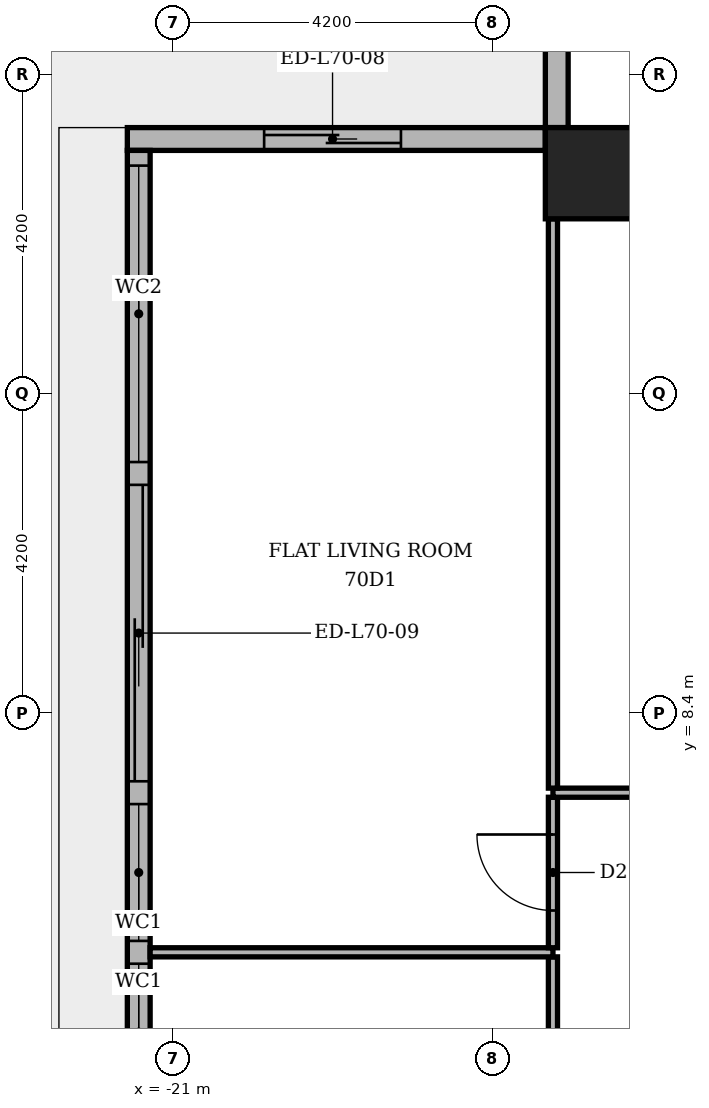
"""IFC4 building model, lengths in metres.
Left out: names, types, materials, properties, quantities, classifications, styles, units other than length and angle.
Written with IfcOpenShell. Run it as: python <this file> out.ifc"""

import sys

from ifc_helpers import new_model, si_unit, direction, frame, frame_2d, origin, origin_2d, place, context, subcontext, project, spatial, rectangle, extrude, element, fill, save


model = new_model("IFC4")
c1 = context("Model", 3, precision=1e-05, world=origin(), true_north=direction((0.0, 1.0)))
c2 = subcontext(c1, "Body", "Model", "MODEL_VIEW")
j1 = project(units=[si_unit("LENGTHUNIT", "METRE"), si_unit("PLANEANGLEUNIT", "RADIAN")], contexts=[c1])
p1 = place(None, origin())
s1 = spatial("IfcSite", under=j1, at=p1, CompositionType="ELEMENT")
p2 = place(p1, origin())
s2 = spatial("IfcBuilding", under=s1, at=p2, CompositionType="ELEMENT")
p3 = place(p2, frame((0.0, 0.0, 292.8)))
s3 = spatial("IfcBuildingStorey", under=s2, at=p3, CompositionType="ELEMENT", Elevation=292.8)
p4 = place(p3, frame((-15.5, 15.5, -0.35), z_axis=(0.0, 0.0, 1.0), x_axis=(1.0, 0.0, 0.0)))
e1 = element("IfcColumn", 1, at=p4, inside=s3, PredefinedType="COLUMN", context=c2, shape_type="SweptSolid", body=[
    extrude(rectangle(XDim=1.2, YDim=1.2, at=origin_2d()), origin(), (0.0, 0.0, 1.0), 4.25),
])
p5 = place(p3, frame((-15.95, 21.3, 0.0), z_axis=(0.0, 0.0, 1.0), x_axis=(0.0, -1.0, 0.0)))
e2 = element("IfcWall", 2, at=p5, inside=s3, PredefinedType="STANDARD", context=c2, shape_type="SweptSolid", body=[
    extrude(rectangle(XDim=5.2, YDim=0.3, at=frame_2d((2.6, 0.0))), origin(), (0.0, 0.0, 1.0), 3.55),
])
p6 = place(p5, frame((1.5, 0.0, 0.0)))
e3 = element("IfcOpeningElement", 3, at=p6, cuts=e2, PredefinedType="OPENING", context=c2, shape_type="SweptSolid", body=[
    extrude(rectangle(XDim=1.8, YDim=2.4, at=frame_2d((0.9, 1.2))), frame((0.0, 0.16, 0.0), z_axis=(0.0, -1.0, 0.0), x_axis=(1.0, 0.0, 0.0)), (0.0, 0.0, 1.0), 0.32),
])
p7 = place(p3, frame((-16.1, 15.95, 0.0), z_axis=(0.0, 0.0, 1.0), x_axis=(-1.0, 0.0, 0.0)))
e4 = element("IfcWall", 4, at=p7, inside=s3, PredefinedType="STANDARD", context=c2, shape_type="SweptSolid", body=[
    extrude(rectangle(XDim=5.5, YDim=0.3, at=frame_2d((2.75, 0.0))), origin(), (0.0, 0.0, 1.0), 3.55),
])
p8 = place(p7, frame((1.9, 0.0, 0.0)))
e5 = element("IfcOpeningElement", 5, at=p8, cuts=e4, PredefinedType="OPENING", context=c2, shape_type="SweptSolid", body=[
    extrude(rectangle(XDim=1.8, YDim=2.4, at=frame_2d((0.9, 1.2))), frame((0.0, 0.16, 0.0), z_axis=(0.0, -1.0, 0.0), x_axis=(1.0, 0.0, 0.0)), (0.0, 0.0, 1.0), 0.32),
])
p9 = place(p3, frame((-21.45, 15.8, 0.0), z_axis=(0.0, 0.0, 1.0), x_axis=(0.0, -1.0, 0.0)))
e6 = element("IfcWall", 6, at=p9, inside=s3, PredefinedType="STANDARD", context=c2, shape_type="SweptSolid", body=[
    extrude(rectangle(XDim=31.9, YDim=0.3, at=frame_2d((15.95, 0.0))), origin(), (0.0, 0.0, 1.0), 3.55),
])
p10 = place(p9, frame((0.2, 0.0, 0.6)))
e7 = element("IfcOpeningElement", 7, at=p10, cuts=e6, PredefinedType="OPENING", context=c2, shape_type="SweptSolid", body=[
    extrude(rectangle(XDim=3.9, YDim=2.4, at=frame_2d((1.95, 1.2))), frame((0.0, 0.16, 0.0), z_axis=(0.0, -1.0, 0.0), x_axis=(1.0, 0.0, 0.0)), (0.0, 0.0, 1.0), 0.32),
])
p11 = place(p9, frame((4.4, 0.0, 0.0)))
e8 = element("IfcOpeningElement", 8, at=p11, cuts=e6, PredefinedType="OPENING", context=c2, shape_type="SweptSolid", body=[
    extrude(rectangle(XDim=3.9, YDim=2.4, at=frame_2d((1.95, 1.2))), frame((0.0, 0.16, 0.0), z_axis=(0.0, -1.0, 0.0), x_axis=(1.0, 0.0, 0.0)), (0.0, 0.0, 1.0), 0.32),
])
p12 = place(p9, frame((8.6, 0.0, 0.6)))
e9 = element("IfcOpeningElement", 9, at=p12, cuts=e6, PredefinedType="OPENING", context=c2, shape_type="SweptSolid", body=[
    extrude(rectangle(XDim=1.8, YDim=2.4, at=frame_2d((0.9, 1.2))), frame((0.0, 0.16, 0.0), z_axis=(0.0, -1.0, 0.0), x_axis=(1.0, 0.0, 0.0)), (0.0, 0.0, 1.0), 0.32),
])
p13 = place(p9, frame((10.7, 0.0, 0.6)))
e10 = element("IfcOpeningElement", 10, at=p13, cuts=e6, PredefinedType="OPENING", context=c2, shape_type="SweptSolid", body=[
    extrude(rectangle(XDim=1.8, YDim=2.4, at=frame_2d((0.9, 1.2))), frame((0.0, 0.16, 0.0), z_axis=(0.0, -1.0, 0.0), x_axis=(1.0, 0.0, 0.0)), (0.0, 0.0, 1.0), 0.32),
])
p14 = place(p9, frame((12.8, 0.0, 0.0)))
e11 = element("IfcOpeningElement", 11, at=p14, cuts=e6, PredefinedType="OPENING", context=c2, shape_type="SweptSolid", body=[
    extrude(rectangle(XDim=3.9, YDim=2.4, at=frame_2d((1.95, 1.2))), frame((0.0, 0.16, 0.0), z_axis=(0.0, -1.0, 0.0), x_axis=(1.0, 0.0, 0.0)), (0.0, 0.0, 1.0), 0.32),
])
p15 = place(p9, frame((17.0, 0.0, 0.6)))
e12 = element("IfcOpeningElement", 12, at=p15, cuts=e6, PredefinedType="OPENING", context=c2, shape_type="SweptSolid", body=[
    extrude(rectangle(XDim=1.8, YDim=2.4, at=frame_2d((0.9, 1.2))), frame((0.0, 0.16, 0.0), z_axis=(0.0, -1.0, 0.0), x_axis=(1.0, 0.0, 0.0)), (0.0, 0.0, 1.0), 0.32),
])
p16 = place(p9, frame((19.1, 0.0, 0.6)))
e13 = element("IfcOpeningElement", 13, at=p16, cuts=e6, PredefinedType="OPENING", context=c2, shape_type="SweptSolid", body=[
    extrude(rectangle(XDim=1.8, YDim=2.4, at=frame_2d((0.9, 1.2))), frame((0.0, 0.16, 0.0), z_axis=(0.0, -1.0, 0.0), x_axis=(1.0, 0.0, 0.0)), (0.0, 0.0, 1.0), 0.32),
])
p17 = place(p9, frame((21.2, 0.0, 0.6)))
e14 = element("IfcOpeningElement", 14, at=p17, cuts=e6, PredefinedType="OPENING", context=c2, shape_type="SweptSolid", body=[
    extrude(rectangle(XDim=1.8, YDim=2.4, at=frame_2d((0.9, 1.2))), frame((0.0, 0.16, 0.0), z_axis=(0.0, -1.0, 0.0), x_axis=(1.0, 0.0, 0.0)), (0.0, 0.0, 1.0), 0.32),
])
p18 = place(p9, frame((23.3, 0.0, 0.6)))
e15 = element("IfcOpeningElement", 15, at=p18, cuts=e6, PredefinedType="OPENING", context=c2, shape_type="SweptSolid", body=[
    extrude(rectangle(XDim=6.0, YDim=2.4, at=frame_2d((3.0, 1.2))), frame((0.0, 0.16, 0.0), z_axis=(0.0, -1.0, 0.0), x_axis=(1.0, 0.0, 0.0)), (0.0, 0.0, 1.0), 0.32),
])
p19 = place(p9, frame((29.6, 0.0, 0.6)))
e16 = element("IfcOpeningElement", 16, at=p19, cuts=e6, PredefinedType="OPENING", context=c2, shape_type="SweptSolid", body=[
    extrude(rectangle(XDim=1.8, YDim=2.4, at=frame_2d((0.9, 1.2))), frame((0.0, 0.16, 0.0), z_axis=(0.0, -1.0, 0.0), x_axis=(1.0, 0.0, 0.0)), (0.0, 0.0, 1.0), 0.32),
])
p20 = place(p3, frame((-16.0, -3.09, 0.0), z_axis=(0.0, 0.0, 1.0), x_axis=(0.0, 1.0, 0.0)))
e17 = element("IfcWall", 17, at=p20, inside=s3, PredefinedType="PARTITIONING", context=c2, shape_type="SweptSolid", body=[
    extrude(rectangle(XDim=8.28, YDim=0.12, at=frame_2d((4.14, 0.0))), origin(), (0.0, 0.0, 1.0), 3.55),
])
p21 = place(p20, frame((3.69, 0.0, 0.0)))
e18 = element("IfcOpeningElement", 18, at=p21, cuts=e17, PredefinedType="OPENING", context=c2, shape_type="SweptSolid", body=[
    extrude(rectangle(XDim=0.9, YDim=2.1, at=frame_2d((0.45, 1.05))), frame((0.0, 0.07, 0.0), z_axis=(0.0, -1.0, 0.0), x_axis=(1.0, 0.0, 0.0)), (0.0, 0.0, 1.0), 0.14),
])
p22 = place(p3, frame((-21.3, 5.25, 0.0), z_axis=(0.0, 0.0, 1.0), x_axis=(1.0, 0.0, 0.0)))
e19 = element("IfcWall", 19, at=p22, inside=s3, PredefinedType="PARTITIONING", context=c2, shape_type="SweptSolid", body=[
    extrude(rectangle(XDim=5.3, YDim=0.12, at=frame_2d((2.65, 0.0))), origin(), (0.0, 0.0, 1.0), 3.55),
])
p23 = place(p3, frame((-16.0, 5.31, 0.0), z_axis=(0.0, 0.0, 1.0), x_axis=(0.0, 1.0, 0.0)))
e20 = element("IfcWall", 20, at=p23, inside=s3, PredefinedType="PARTITIONING", context=c2, shape_type="SweptSolid", body=[
    extrude(rectangle(XDim=1.98, YDim=0.12, at=frame_2d((0.99, 0.0))), origin(), (0.0, 0.0, 1.0), 3.55),
])
p24 = place(p23, frame((0.49, 0.0, 0.0)))
e21 = element("IfcOpeningElement", 21, at=p24, cuts=e20, PredefinedType="OPENING", context=c2, shape_type="SweptSolid", body=[
    extrude(rectangle(XDim=1.0, YDim=2.1, at=frame_2d((0.5, 1.05))), frame((0.0, 0.07, 0.0), z_axis=(0.0, -1.0, 0.0), x_axis=(1.0, 0.0, 0.0)), (0.0, 0.0, 1.0), 0.14),
])
p25 = place(p3, frame((-16.0, 7.35, 0.0), z_axis=(0.0, 0.0, 1.0), x_axis=(1.0, 0.0, 0.0)))
e22 = element("IfcWall", 22, at=p25, inside=s3, PredefinedType="PARTITIONING", context=c2, shape_type="SweptSolid", body=[
    extrude(rectangle(XDim=8.65, YDim=0.12, at=frame_2d((4.325, 0.0))), origin(), (0.0, 0.0, 1.0), 3.55),
])
p26 = place(p25, frame((3.875, 0.0, 0.0)))
e23 = element("IfcOpeningElement", 23, at=p26, cuts=e22, PredefinedType="OPENING", context=c2, shape_type="SweptSolid", body=[
    extrude(rectangle(XDim=0.9, YDim=2.1, at=frame_2d((0.45, 1.05))), frame((0.0, 0.07, 0.0), z_axis=(0.0, -1.0, 0.0), x_axis=(1.0, 0.0, 0.0)), (0.0, 0.0, 1.0), 0.14),
])
p27 = place(p3, frame((-16.0, 7.41, 0.0), z_axis=(0.0, 0.0, 1.0), x_axis=(0.0, 1.0, 0.0)))
e24 = element("IfcWall", 24, at=p27, inside=s3, PredefinedType="PARTITIONING", context=c2, shape_type="SweptSolid", body=[
    extrude(rectangle(XDim=7.49, YDim=0.12, at=frame_2d((3.745, 0.0))), origin(), (0.0, 0.0, 1.0), 3.55),
])
p28 = place(p8, origin())
e25 = element("IfcDoor", 25, at=p28, inside=s3, OperationType="SLIDING_TO_LEFT", PredefinedType="DOOR", context=c2, shape_type="SweptSolid", body=[
    extrude(rectangle(XDim=1.8, YDim=2.4, at=frame_2d((0.9, 1.2))), frame((0.0, 0.025, 0.0), z_axis=(0.0, -1.0, 0.0), x_axis=(1.0, 0.0, 0.0)), (0.0, 0.0, 1.0), 0.05),
])
fill(e5, e25)
p29 = place(p10, origin())
e26 = element("IfcWindow", 26, at=p29, inside=s3, PartitioningType="SINGLE_PANEL", PredefinedType="WINDOW", context=c2, shape_type="SweptSolid", body=[
    extrude(rectangle(XDim=3.9, YDim=2.4, at=frame_2d((1.95, 1.2))), frame((0.0, 0.03, 0.0), z_axis=(0.0, -1.0, 0.0), x_axis=(1.0, 0.0, 0.0)), (0.0, 0.0, 1.0), 0.06),
])
fill(e7, e26)
p30 = place(p11, origin())
e27 = element("IfcDoor", 27, at=p30, inside=s3, OperationType="SLIDING_TO_RIGHT", PredefinedType="DOOR", context=c2, shape_type="SweptSolid", body=[
    extrude(rectangle(XDim=3.9, YDim=2.4, at=frame_2d((1.95, 1.2))), frame((0.0, 0.025, 0.0), z_axis=(0.0, -1.0, 0.0), x_axis=(1.0, 0.0, 0.0)), (0.0, 0.0, 1.0), 0.05),
])
fill(e8, e27)
p31 = place(p12, origin())
e28 = element("IfcWindow", 28, at=p31, inside=s3, PartitioningType="SINGLE_PANEL", PredefinedType="WINDOW", context=c2, shape_type="SweptSolid", body=[
    extrude(rectangle(XDim=1.8, YDim=2.4, at=frame_2d((0.9, 1.2))), frame((0.0, 0.03, 0.0), z_axis=(0.0, -1.0, 0.0), x_axis=(1.0, 0.0, 0.0)), (0.0, 0.0, 1.0), 0.06),
])
fill(e9, e28)
p32 = place(p13, origin())
e29 = element("IfcWindow", 29, at=p32, inside=s3, PartitioningType="SINGLE_PANEL", PredefinedType="WINDOW", context=c2, shape_type="SweptSolid", body=[
    extrude(rectangle(XDim=1.8, YDim=2.4, at=frame_2d((0.9, 1.2))), frame((0.0, 0.03, 0.0), z_axis=(0.0, -1.0, 0.0), x_axis=(1.0, 0.0, 0.0)), (0.0, 0.0, 1.0), 0.06),
])
fill(e10, e29)
p33 = place(p24, origin())
e30 = element("IfcDoor", 30, at=p33, inside=s3, OperationType="SINGLE_SWING_RIGHT", PredefinedType="DOOR", context=c2, shape_type="SweptSolid", body=[
    extrude(rectangle(XDim=1.0, YDim=2.1, at=frame_2d((0.5, 1.05))), frame((0.0, 0.025, 0.0), z_axis=(0.0, -1.0, 0.0), x_axis=(1.0, 0.0, 0.0)), (0.0, 0.0, 1.0), 0.05),
])
fill(e21, e30)
save(model, sys.argv[1])
